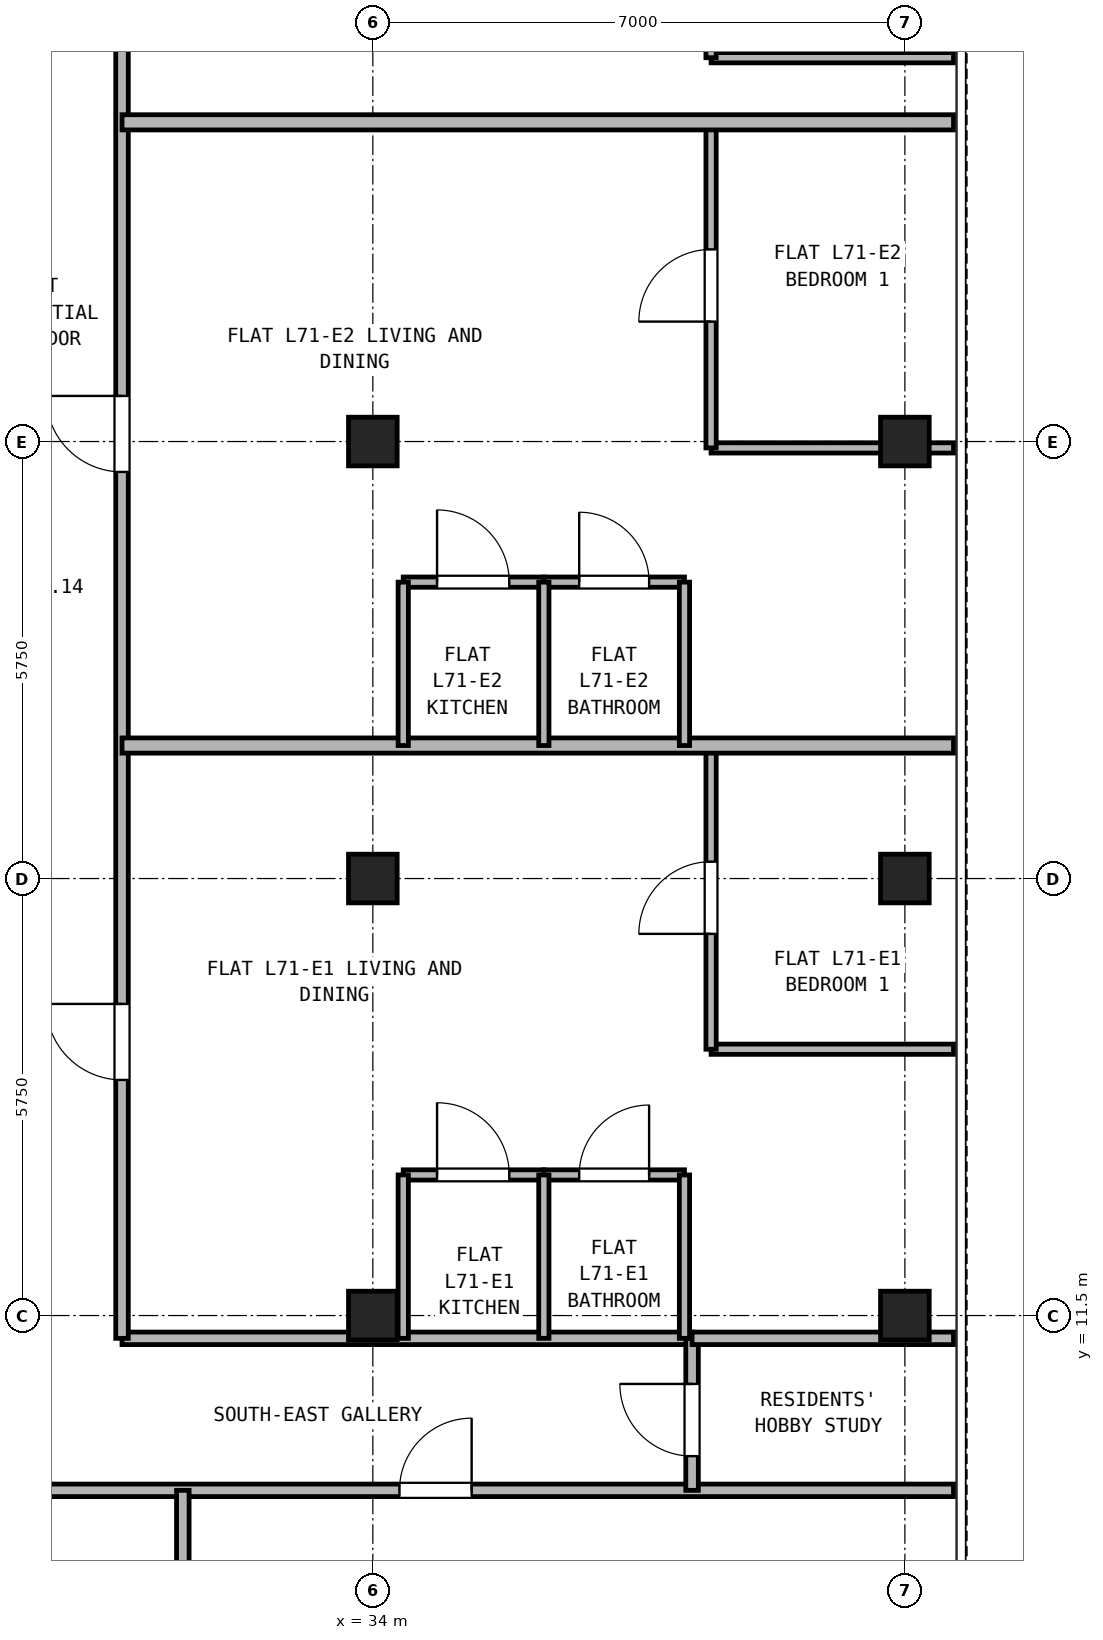
"""IFC4 building model, lengths in metres.
Left out: names, types, materials, properties, quantities, classifications, styles, units other than length and angle.
Written with IfcOpenShell. Run it as: python <this file> out.ifc"""

import sys

from ifc_helpers import new_model, si_unit, direction, frame, frame_2d, origin, origin_2d, place, context, subcontext, project, spatial, rectangle, hollow_rectangle, extrude, source, transform, mapped, element, fill, save


model = new_model("IFC4")
c1 = context("Model", 3, precision=1e-05, world=origin(), true_north=direction((0.0, 1.0)))
c2 = subcontext(c1, "Body", "Model", "MODEL_VIEW")
j1 = project(units=[si_unit("LENGTHUNIT", "METRE"), si_unit("PLANEANGLEUNIT", "RADIAN")], contexts=[c1])
p1 = place(None, origin())
s1 = spatial("IfcSite", under=j1, at=p1, CompositionType="ELEMENT")
p2 = place(p1, origin())
s2 = spatial("IfcBuilding", under=s1, at=p2, CompositionType="ELEMENT")
p3 = place(p2, frame((0.0, 0.0, 248.9)))
s3 = spatial("IfcBuildingStorey", under=s2, at=p3, CompositionType="ELEMENT", Elevation=248.9)
m1 = source(origin(), c2, "Body", "SweptSolid", [
    extrude(hollow_rectangle(XDim=0.64, YDim=0.64, WallThickness=0.035, at=origin_2d()), origin(), (0.0, 0.0, 1.0), 2.98),
])
for number, where, z_axis, x_axis in (
    (1, (41.0, 11.5, 0.0), (0.0, 0.0, 1.0), (1.0, 0.0, 0.0)),
    (2, (41.0, 17.25, 0.0), (0.0, 0.0, 1.0), (1.0, 0.0, 0.0)),
    (3, (41.0, 23.0, 0.0), (0.0, 0.0, 1.0), (1.0, 0.0, 0.0)),
    (4, (34.0, 11.5, 0.0), (0.0, 0.0, 1.0), (1.0, 0.0, 0.0)),
    (5, (34.0, 17.25, 0.0), (0.0, 0.0, 1.0), (1.0, 0.0, 0.0)),
    (6, (34.0, 23.0, 0.0), (0.0, 0.0, 1.0), (1.0, 0.0, 0.0)),
):
    element("IfcColumn", number, at=place(p3, frame(where, z_axis=z_axis, x_axis=x_axis)), inside=s3, PredefinedType="COLUMN", context=c2, shape_type="MappedRepresentation", body=[
        mapped(m1, transform((0.0, 0.0, 0.0), x_axis=(1.0, 0.0, 0.0), y_axis=(0.0, 1.0, 0.0), z_axis=(0.0, 0.0, 1.0), scale=1.0)),
    ])
p4 = place(p3, frame((5.36, 9.2, 0.0), z_axis=(0.0, 0.0, 1.0), x_axis=(1.0, 0.0, 0.0)))
e7 = element("IfcWall", 7, at=p4, inside=s3, PredefinedType="PARTITIONING", context=c2, shape_type="SweptSolid", body=[
    extrude(rectangle(XDim=36.28, YDim=0.165, at=frame_2d((18.14, 0.0))), origin(), (0.0, 0.0, 1.0), 2.98),
])
p5 = place(p4, frame((7.17, 0.0, 0.0)))
e8 = element("IfcOpeningElement", 8, at=p5, cuts=e7, PredefinedType="OPENING", context=c2, shape_type="SweptSolid", body=[
    extrude(rectangle(XDim=0.95, YDim=2.15, at=frame_2d((0.475, 1.075))), frame((0.0, 0.093, 0.0), z_axis=(0.0, -1.0, 0.0), x_axis=(1.0, 0.0, 0.0)), (0.0, 0.0, 1.0), 0.185),
])
p6 = place(p4, frame((15.39, 0.0, 0.0)))
e9 = element("IfcOpeningElement", 9, at=p6, cuts=e7, PredefinedType="OPENING", context=c2, shape_type="SweptSolid", body=[
    extrude(rectangle(XDim=0.95, YDim=2.15, at=frame_2d((0.475, 1.075))), frame((0.0, 0.093, 0.0), z_axis=(0.0, -1.0, 0.0), x_axis=(1.0, 0.0, 0.0)), (0.0, 0.0, 1.0), 0.185),
])
p7 = place(p4, frame((22.39, 0.0, 0.0)))
e10 = element("IfcOpeningElement", 10, at=p7, cuts=e7, PredefinedType="OPENING", context=c2, shape_type="SweptSolid", body=[
    extrude(rectangle(XDim=0.95, YDim=2.15, at=frame_2d((0.475, 1.075))), frame((0.0, 0.093, 0.0), z_axis=(0.0, -1.0, 0.0), x_axis=(1.0, 0.0, 0.0)), (0.0, 0.0, 1.0), 0.185),
])
p8 = place(p4, frame((28.99, 0.0, 0.0)))
e11 = element("IfcOpeningElement", 11, at=p8, cuts=e7, PredefinedType="OPENING", context=c2, shape_type="SweptSolid", body=[
    extrude(rectangle(XDim=0.95, YDim=2.15, at=frame_2d((0.475, 1.075))), frame((0.0, 0.093, 0.0), z_axis=(0.0, -1.0, 0.0), x_axis=(1.0, 0.0, 0.0)), (0.0, 0.0, 1.0), 0.185),
])
p9 = place(p3, frame((30.7, 11.2, 0.0), z_axis=(0.0, 0.0, 1.0), x_axis=(1.0, 0.0, 0.0)))
e12 = element("IfcWall", 12, at=p9, inside=s3, PredefinedType="PARTITIONING", context=c2, shape_type="SweptSolid", body=[
    extrude(rectangle(XDim=7.5, YDim=0.165, at=frame_2d((3.75, 0.0))), origin(), (0.0, 0.0, 1.0), 2.98),
])
p10 = place(p3, frame((38.2, 9.2, 0.0), z_axis=(0.0, 0.0, 1.0), x_axis=(0.0, 1.0, 0.0)))
e13 = element("IfcWall", 13, at=p10, inside=s3, PredefinedType="PARTITIONING", context=c2, shape_type="SweptSolid", body=[
    extrude(rectangle(XDim=2.0, YDim=0.165, at=frame_2d((1.0, 0.0))), origin(), (0.0, 0.0, 1.0), 2.98),
])
p11 = place(p10, frame((0.45, 0.0, 0.0)))
e14 = element("IfcOpeningElement", 14, at=p11, cuts=e13, PredefinedType="OPENING", context=c2, shape_type="SweptSolid", body=[
    extrude(rectangle(XDim=0.95, YDim=2.15, at=frame_2d((0.475, 1.075))), frame((0.0, 0.093, 0.0), z_axis=(0.0, -1.0, 0.0), x_axis=(1.0, 0.0, 0.0)), (0.0, 0.0, 1.0), 0.185),
])
p12 = place(p3, frame((30.7, 11.2, 0.0), z_axis=(0.0, 0.0, 1.0), x_axis=(0.0, 1.0, 0.0)))
e15 = element("IfcWall", 15, at=p12, inside=s3, PredefinedType="PARTITIONING", context=c2, shape_type="SweptSolid", body=[
    extrude(rectangle(XDim=23.94, YDim=0.165, at=frame_2d((11.97, 0.0))), origin(), (0.0, 0.0, 1.0), 2.98),
])
p13 = place(p12, frame((3.4, 0.0, 0.0)))
e16 = element("IfcOpeningElement", 16, at=p13, cuts=e15, PredefinedType="OPENING", context=c2, shape_type="SweptSolid", body=[
    extrude(rectangle(XDim=1.0, YDim=2.15, at=frame_2d((0.5, 1.075))), frame((0.0, 0.093, 0.0), z_axis=(0.0, -1.0, 0.0), x_axis=(1.0, 0.0, 0.0)), (0.0, 0.0, 1.0), 0.185),
])
p14 = place(p12, frame((11.4, 0.0, 0.0)))
e17 = element("IfcOpeningElement", 17, at=p14, cuts=e15, PredefinedType="OPENING", context=c2, shape_type="SweptSolid", body=[
    extrude(rectangle(XDim=1.0, YDim=2.15, at=frame_2d((0.5, 1.075))), frame((0.0, 0.093, 0.0), z_axis=(0.0, -1.0, 0.0), x_axis=(1.0, 0.0, 0.0)), (0.0, 0.0, 1.0), 0.185),
])
p15 = place(p12, frame((17.05, 0.0, 0.0)))
e18 = element("IfcOpeningElement", 18, at=p15, cuts=e15, PredefinedType="OPENING", context=c2, shape_type="SweptSolid", body=[
    extrude(rectangle(XDim=1.0, YDim=2.15, at=frame_2d((0.5, 1.075))), frame((0.0, 0.093, 0.0), z_axis=(0.0, -1.0, 0.0), x_axis=(1.0, 0.0, 0.0)), (0.0, 0.0, 1.0), 0.185),
])
p16 = place(p3, frame((31.5, 0.16, 0.0), z_axis=(0.0, 0.0, 1.0), x_axis=(0.0, 1.0, 0.0)))
e19 = element("IfcWall", 19, at=p16, inside=s3, PredefinedType="PARTITIONING", context=c2, shape_type="SweptSolid", body=[
    extrude(rectangle(XDim=9.04, YDim=0.165, at=frame_2d((4.52, 0.0))), origin(), (0.0, 0.0, 1.0), 2.98),
])
p17 = place(p3, frame((38.2, 11.2, 0.0), z_axis=(0.0, 0.0, 1.0), x_axis=(1.0, 0.0, 0.0)))
e20 = element("IfcWall", 20, at=p17, inside=s3, PredefinedType="PARTITIONING", context=c2, shape_type="SweptSolid", body=[
    extrude(rectangle(XDim=3.44, YDim=0.165, at=frame_2d((1.72, 0.0))), origin(), (0.0, 0.0, 1.0), 2.98),
])
p18 = place(p3, frame((34.4, 13.35, 0.0), z_axis=(0.0, 0.0, 1.0), x_axis=(1.0, 0.0, 0.0)))
e21 = element("IfcWall", 21, at=p18, inside=s3, PredefinedType="PARTITIONING", context=c2, shape_type="SweptSolid", body=[
    extrude(rectangle(XDim=1.85, YDim=0.135, at=frame_2d((0.925, 0.0))), origin(), (0.0, 0.0, 1.0), 2.98),
])
p19 = place(p18, frame((0.445, 0.0, 0.0)))
e22 = element("IfcOpeningElement", 22, at=p19, cuts=e21, PredefinedType="OPENING", context=c2, shape_type="SweptSolid", body=[
    extrude(rectangle(XDim=0.95, YDim=2.15, at=frame_2d((0.475, 1.075))), frame((0.0, 0.077, 0.0), z_axis=(0.0, -1.0, 0.0), x_axis=(1.0, 0.0, 0.0)), (0.0, 0.0, 1.0), 0.155),
])
p20 = place(p3, frame((36.25, 13.35, 0.0), z_axis=(0.0, 0.0, 1.0), x_axis=(1.0, 0.0, 0.0)))
e23 = element("IfcWall", 23, at=p20, inside=s3, PredefinedType="PARTITIONING", context=c2, shape_type="SweptSolid", body=[
    extrude(rectangle(XDim=1.85, YDim=0.135, at=frame_2d((0.925, 0.0))), origin(), (0.0, 0.0, 1.0), 2.98),
])
p21 = place(p20, frame((0.465, 0.0, 0.0)))
e24 = element("IfcOpeningElement", 24, at=p21, cuts=e23, PredefinedType="OPENING", context=c2, shape_type="SweptSolid", body=[
    extrude(rectangle(XDim=0.92, YDim=2.1, at=frame_2d((0.46, 1.05))), frame((0.0, 0.077, 0.0), z_axis=(0.0, -1.0, 0.0), x_axis=(1.0, 0.0, 0.0)), (0.0, 0.0, 1.0), 0.155),
])
for number, where, z_axis, x_axis in (
    (25, (34.4, 11.2, 0.0), (0.0, 0.0, 1.0), (0.0, 1.0, 0.0)),
    (26, (36.25, 11.2, 0.0), (0.0, 0.0, 1.0), (0.0, 1.0, 0.0)),
    (27, (38.1, 11.2, 0.0), (0.0, 0.0, 1.0), (0.0, 1.0, 0.0)),
):
    element("IfcWall", number, at=place(p3, frame(where, z_axis=z_axis, x_axis=x_axis)), inside=s3, PredefinedType="PARTITIONING", context=c2, shape_type="SweptSolid", body=[
        extrude(rectangle(XDim=2.15, YDim=0.135, at=frame_2d((1.075, 0.0))), origin(), (0.0, 0.0, 1.0), 2.98),
    ])
p22 = place(p3, frame((38.45, 15.004, 0.0), z_axis=(0.0, 0.0, 1.0), x_axis=(1.0, 0.0, 0.0)))
e28 = element("IfcWall", 28, at=p22, inside=s3, PredefinedType="PARTITIONING", context=c2, shape_type="SweptSolid", body=[
    extrude(rectangle(XDim=3.19, YDim=0.135, at=frame_2d((1.595, 0.0))), origin(), (0.0, 0.0, 1.0), 2.98),
])
p23 = place(p3, frame((38.45, 15.004, 0.0), z_axis=(0.0, 0.0, 1.0), x_axis=(0.0, 1.0, 0.0)))
e29 = element("IfcWall", 29, at=p23, inside=s3, PredefinedType="PARTITIONING", context=c2, shape_type="SweptSolid", body=[
    extrude(rectangle(XDim=3.996, YDim=0.135, at=frame_2d((1.998, 0.0))), origin(), (0.0, 0.0, 1.0), 2.98),
])
p24 = place(p23, frame((1.518, 0.0, 0.0)))
e30 = element("IfcOpeningElement", 30, at=p24, cuts=e29, PredefinedType="OPENING", context=c2, shape_type="SweptSolid", body=[
    extrude(rectangle(XDim=0.95, YDim=2.15, at=frame_2d((0.475, 1.075))), frame((0.0, 0.077, 0.0), z_axis=(0.0, -1.0, 0.0), x_axis=(1.0, 0.0, 0.0)), (0.0, 0.0, 1.0), 0.155),
])
p25 = place(p3, frame((30.7, 19.0, 0.0), z_axis=(0.0, 0.0, 1.0), x_axis=(1.0, 0.0, 0.0)))
e31 = element("IfcWall", 31, at=p25, inside=s3, PredefinedType="PARTITIONING", context=c2, shape_type="SweptSolid", body=[
    extrude(rectangle(XDim=10.94, YDim=0.2, at=frame_2d((5.47, 0.0))), origin(), (0.0, 0.0, 1.0), 2.98),
])
p26 = place(p3, frame((34.4, 21.15, 0.0), z_axis=(0.0, 0.0, 1.0), x_axis=(1.0, 0.0, 0.0)))
e32 = element("IfcWall", 32, at=p26, inside=s3, PredefinedType="PARTITIONING", context=c2, shape_type="SweptSolid", body=[
    extrude(rectangle(XDim=1.85, YDim=0.135, at=frame_2d((0.925, 0.0))), origin(), (0.0, 0.0, 1.0), 2.98),
])
p27 = place(p26, frame((0.445, 0.0, 0.0)))
e33 = element("IfcOpeningElement", 33, at=p27, cuts=e32, PredefinedType="OPENING", context=c2, shape_type="SweptSolid", body=[
    extrude(rectangle(XDim=0.95, YDim=2.15, at=frame_2d((0.475, 1.075))), frame((0.0, 0.077, 0.0), z_axis=(0.0, -1.0, 0.0), x_axis=(1.0, 0.0, 0.0)), (0.0, 0.0, 1.0), 0.155),
])
p28 = place(p3, frame((36.25, 21.15, 0.0), z_axis=(0.0, 0.0, 1.0), x_axis=(1.0, 0.0, 0.0)))
e34 = element("IfcWall", 34, at=p28, inside=s3, PredefinedType="PARTITIONING", context=c2, shape_type="SweptSolid", body=[
    extrude(rectangle(XDim=1.85, YDim=0.135, at=frame_2d((0.925, 0.0))), origin(), (0.0, 0.0, 1.0), 2.98),
])
p29 = place(p28, frame((0.465, 0.0, 0.0)))
e35 = element("IfcOpeningElement", 35, at=p29, cuts=e34, PredefinedType="OPENING", context=c2, shape_type="SweptSolid", body=[
    extrude(rectangle(XDim=0.92, YDim=2.1, at=frame_2d((0.46, 1.05))), frame((0.0, 0.077, 0.0), z_axis=(0.0, -1.0, 0.0), x_axis=(1.0, 0.0, 0.0)), (0.0, 0.0, 1.0), 0.155),
])
for number, where, z_axis, x_axis in (
    (36, (34.4, 19.0, 0.0), (0.0, 0.0, 1.0), (0.0, 1.0, 0.0)),
    (37, (36.25, 19.0, 0.0), (0.0, 0.0, 1.0), (0.0, 1.0, 0.0)),
    (38, (38.1, 19.0, 0.0), (0.0, 0.0, 1.0), (0.0, 1.0, 0.0)),
):
    element("IfcWall", number, at=place(p3, frame(where, z_axis=z_axis, x_axis=x_axis)), inside=s3, PredefinedType="PARTITIONING", context=c2, shape_type="SweptSolid", body=[
        extrude(rectangle(XDim=2.15, YDim=0.135, at=frame_2d((1.075, 0.0))), origin(), (0.0, 0.0, 1.0), 2.98),
    ])
p30 = place(p3, frame((38.45, 22.916, 0.0), z_axis=(0.0, 0.0, 1.0), x_axis=(1.0, 0.0, 0.0)))
e39 = element("IfcWall", 39, at=p30, inside=s3, PredefinedType="PARTITIONING", context=c2, shape_type="SweptSolid", body=[
    extrude(rectangle(XDim=3.19, YDim=0.135, at=frame_2d((1.595, 0.0))), origin(), (0.0, 0.0, 1.0), 2.428),
])
p31 = place(p3, frame((38.45, 22.916, 0.0), z_axis=(0.0, 0.0, 1.0), x_axis=(0.0, 1.0, 0.0)))
e40 = element("IfcWall", 40, at=p31, inside=s3, PredefinedType="PARTITIONING", context=c2, shape_type="SweptSolid", body=[
    extrude(rectangle(XDim=4.284, YDim=0.135, at=frame_2d((2.142, 0.0))), origin(), (0.0, 0.0, 1.0), 2.98),
])
p32 = place(p31, frame((1.662, 0.0, 0.0)))
e41 = element("IfcOpeningElement", 41, at=p32, cuts=e40, PredefinedType="OPENING", context=c2, shape_type="SweptSolid", body=[
    extrude(rectangle(XDim=0.95, YDim=2.15, at=frame_2d((0.475, 1.075))), frame((0.0, 0.077, 0.0), z_axis=(0.0, -1.0, 0.0), x_axis=(1.0, 0.0, 0.0)), (0.0, 0.0, 1.0), 0.155),
])
p33 = place(p3, frame((30.7, 27.2, 0.0), z_axis=(0.0, 0.0, 1.0), x_axis=(1.0, 0.0, 0.0)))
e42 = element("IfcWall", 42, at=p33, inside=s3, PredefinedType="PARTITIONING", context=c2, shape_type="SweptSolid", body=[
    extrude(rectangle(XDim=10.94, YDim=0.2, at=frame_2d((5.47, 0.0))), origin(), (0.0, 0.0, 1.0), 2.98),
])
p34 = place(p3, frame((38.45, 28.05, 0.0), z_axis=(0.0, 0.0, 1.0), x_axis=(1.0, 0.0, 0.0)))
e43 = element("IfcWall", 43, at=p34, inside=s3, PredefinedType="PARTITIONING", context=c2, shape_type="SweptSolid", body=[
    extrude(rectangle(XDim=3.19, YDim=0.135, at=frame_2d((1.595, 0.0))), origin(), (0.0, 0.0, 1.0), 2.98),
])
p35 = place(p3, frame((38.45, 28.05, 0.0), z_axis=(0.0, 0.0, 1.0), x_axis=(0.0, 1.0, 0.0)))
e44 = element("IfcWall", 44, at=p35, inside=s3, PredefinedType="PARTITIONING", context=c2, shape_type="SweptSolid", body=[
    extrude(rectangle(XDim=3.4, YDim=0.135, at=frame_2d((1.7, 0.0))), origin(), (0.0, 0.0, 1.0), 2.98),
])
p36 = place(p35, frame((1.22, 0.0, 0.0)))
e45 = element("IfcOpeningElement", 45, at=p36, cuts=e44, PredefinedType="OPENING", context=c2, shape_type="SweptSolid", body=[
    extrude(rectangle(XDim=0.95, YDim=2.15, at=frame_2d((0.475, 1.075))), frame((0.0, 0.077, 0.0), z_axis=(0.0, -1.0, 0.0), x_axis=(1.0, 0.0, 0.0)), (0.0, 0.0, 1.0), 0.155),
])
p37 = place(p8, frame((0.95, 0.0, 0.0), z_axis=(0.0, 0.0, 1.0), x_axis=(-1.0, 0.0, 0.0)))
e46 = element("IfcDoor", 46, at=p37, inside=s3, OperationType="SINGLE_SWING_RIGHT", PredefinedType="DOOR", context=c2, shape_type="SweptSolid", body=[
    extrude(rectangle(XDim=0.95, YDim=2.15, at=frame_2d((0.475, 1.075))), frame((0.0, 0.025, 0.0), z_axis=(0.0, -1.0, 0.0), x_axis=(1.0, 0.0, 0.0)), (0.0, 0.0, 1.0), 0.05),
])
fill(e11, e46)
p38 = place(p11, origin())
e47 = element("IfcDoor", 47, at=p38, inside=s3, OperationType="SINGLE_SWING_RIGHT", PredefinedType="DOOR", context=c2, shape_type="SweptSolid", body=[
    extrude(rectangle(XDim=0.95, YDim=2.15, at=frame_2d((0.475, 1.075))), frame((0.0, 0.025, 0.0), z_axis=(0.0, -1.0, 0.0), x_axis=(1.0, 0.0, 0.0)), (0.0, 0.0, 1.0), 0.05),
])
fill(e14, e47)
p39 = place(p19, origin())
e48 = element("IfcDoor", 48, at=p39, inside=s3, OperationType="SINGLE_SWING_LEFT", PredefinedType="DOOR", context=c2, shape_type="SweptSolid", body=[
    extrude(rectangle(XDim=0.95, YDim=2.15, at=frame_2d((0.475, 1.075))), frame((0.0, 0.025, 0.0), z_axis=(0.0, -1.0, 0.0), x_axis=(1.0, 0.0, 0.0)), (0.0, 0.0, 1.0), 0.05),
])
fill(e22, e48)
p40 = place(p21, origin())
e49 = element("IfcDoor", 49, at=p40, inside=s3, OperationType="SINGLE_SWING_RIGHT", PredefinedType="DOOR", context=c2, shape_type="SweptSolid", body=[
    extrude(rectangle(XDim=0.92, YDim=2.1, at=frame_2d((0.46, 1.05))), frame((0.0, 0.025, 0.0), z_axis=(0.0, -1.0, 0.0), x_axis=(1.0, 0.0, 0.0)), (0.0, 0.0, 1.0), 0.05),
])
fill(e24, e49)
p41 = place(p24, frame((0.95, 0.0, 0.0), z_axis=(0.0, 0.0, 1.0), x_axis=(-1.0, 0.0, 0.0)))
e50 = element("IfcDoor", 50, at=p41, inside=s3, OperationType="SINGLE_SWING_LEFT", PredefinedType="DOOR", context=c2, shape_type="SweptSolid", body=[
    extrude(rectangle(XDim=0.95, YDim=2.15, at=frame_2d((0.475, 1.075))), frame((0.0, 0.025, 0.0), z_axis=(0.0, -1.0, 0.0), x_axis=(1.0, 0.0, 0.0)), (0.0, 0.0, 1.0), 0.05),
])
fill(e30, e50)
p42 = place(p13, frame((1.0, 0.0, 0.0), z_axis=(0.0, 0.0, 1.0), x_axis=(-1.0, 0.0, 0.0)))
e51 = element("IfcDoor", 51, at=p42, inside=s3, OperationType="SINGLE_SWING_RIGHT", PredefinedType="DOOR", context=c2, shape_type="SweptSolid", body=[
    extrude(rectangle(XDim=1.0, YDim=2.15, at=frame_2d((0.5, 1.075))), frame((0.0, 0.025, 0.0), z_axis=(0.0, -1.0, 0.0), x_axis=(1.0, 0.0, 0.0)), (0.0, 0.0, 1.0), 0.05),
])
fill(e16, e51)
p43 = place(p27, origin())
e52 = element("IfcDoor", 52, at=p43, inside=s3, OperationType="SINGLE_SWING_LEFT", PredefinedType="DOOR", context=c2, shape_type="SweptSolid", body=[
    extrude(rectangle(XDim=0.95, YDim=2.15, at=frame_2d((0.475, 1.075))), frame((0.0, 0.025, 0.0), z_axis=(0.0, -1.0, 0.0), x_axis=(1.0, 0.0, 0.0)), (0.0, 0.0, 1.0), 0.05),
])
fill(e33, e52)
p44 = place(p29, origin())
e53 = element("IfcDoor", 53, at=p44, inside=s3, OperationType="SINGLE_SWING_LEFT", PredefinedType="DOOR", context=c2, shape_type="SweptSolid", body=[
    extrude(rectangle(XDim=0.92, YDim=2.1, at=frame_2d((0.46, 1.05))), frame((0.0, 0.025, 0.0), z_axis=(0.0, -1.0, 0.0), x_axis=(1.0, 0.0, 0.0)), (0.0, 0.0, 1.0), 0.05),
])
fill(e35, e53)
p45 = place(p32, frame((0.95, 0.0, 0.0), z_axis=(0.0, 0.0, 1.0), x_axis=(-1.0, 0.0, 0.0)))
e54 = element("IfcDoor", 54, at=p45, inside=s3, OperationType="SINGLE_SWING_LEFT", PredefinedType="DOOR", context=c2, shape_type="SweptSolid", body=[
    extrude(rectangle(XDim=0.95, YDim=2.15, at=frame_2d((0.475, 1.075))), frame((0.0, 0.025, 0.0), z_axis=(0.0, -1.0, 0.0), x_axis=(1.0, 0.0, 0.0)), (0.0, 0.0, 1.0), 0.05),
])
fill(e41, e54)
p46 = place(p14, frame((1.0, 0.0, 0.0), z_axis=(0.0, 0.0, 1.0), x_axis=(-1.0, 0.0, 0.0)))
e55 = element("IfcDoor", 55, at=p46, inside=s3, OperationType="SINGLE_SWING_RIGHT", PredefinedType="DOOR", context=c2, shape_type="SweptSolid", body=[
    extrude(rectangle(XDim=1.0, YDim=2.15, at=frame_2d((0.5, 1.075))), frame((0.0, 0.025, 0.0), z_axis=(0.0, -1.0, 0.0), x_axis=(1.0, 0.0, 0.0)), (0.0, 0.0, 1.0), 0.05),
])
fill(e17, e55)
save(model, sys.argv[1])
